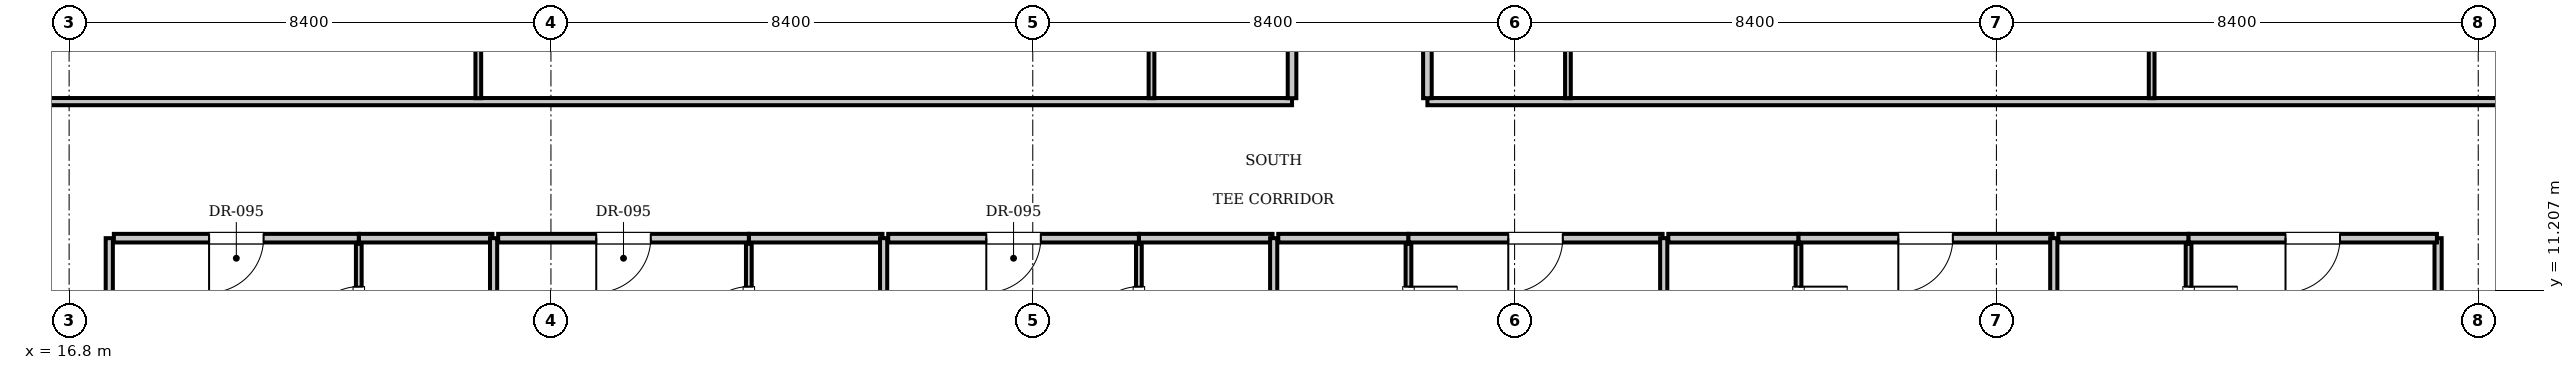
"""IFC4 building model, lengths in metres.
Left out: names, types, materials, properties, quantities, classifications, styles, units other than length and angle.
Written with IfcOpenShell. Run it as: python <this file> out.ifc"""

import sys

from ifc_helpers import new_model, si_unit, direction, frame, frame_2d, origin, place, context, subcontext, project, spatial, rectangle, extrude, element, fill, save


model = new_model("IFC4")
c1 = context("Model", 3, precision=1e-05, world=origin(), true_north=direction((0.0, 1.0)))
c2 = subcontext(c1, "Body", "Model", "MODEL_VIEW")
j1 = project(units=[si_unit("LENGTHUNIT", "METRE"), si_unit("PLANEANGLEUNIT", "RADIAN")], contexts=[c1])
p1 = place(None, origin())
s1 = spatial("IfcSite", under=j1, at=p1, CompositionType="ELEMENT")
p2 = place(p1, origin())
s2 = spatial("IfcBuilding", under=s1, at=p2, CompositionType="ELEMENT")
p3 = place(p2, frame((0.0, 0.0, 154.35)))
s3 = spatial("IfcBuildingStorey", under=s2, at=p3, CompositionType="ELEMENT", Elevation=154.35)
for number, where, z_axis, x_axis in (
    (1, (17.5, 9.0, 0.0), (0.0, 0.0, 1.0), (0.0, 1.0, 0.0)),
    (2, (58.1, 9.0, 0.0), (0.0, 0.0, 1.0), (0.0, 1.0, 0.0)),
):
    element("IfcWall", number, at=place(p3, frame(where, z_axis=z_axis, x_axis=x_axis)), inside=s3, PredefinedType="PARTITIONING", context=c2, shape_type="SweptSolid", body=[
        extrude(rectangle(XDim=3.12, YDim=0.125, at=frame_2d((1.56, 0.0))), origin(), (0.0, 0.0, 1.0), 3.61),
    ])
p4 = place(p3, frame((21.85, 12.12, 0.0), z_axis=(0.0, 0.0, 1.0), x_axis=(1.0, 0.0, 0.0)))
e3 = element("IfcWall", 3, at=p4, inside=s3, PredefinedType="PARTITIONING", context=c2, shape_type="SweptSolid", body=[
    extrude(rectangle(XDim=2.33, YDim=0.15, at=frame_2d((1.165, 0.0))), origin(), (0.0, 0.0, 1.0), 3.61),
])
p5 = place(p3, frame((21.85, 9.68, 0.0), z_axis=(0.0, 0.0, 1.0), x_axis=(0.0, 1.0, 0.0)))
e4 = element("IfcWall", 4, at=p5, inside=s3, PredefinedType="PARTITIONING", context=c2, shape_type="SweptSolid", body=[
    extrude(rectangle(XDim=2.34, YDim=0.1, at=frame_2d((1.17, 0.0))), origin(), (0.0, 0.0, 1.0), 3.61),
])
p6 = place(p5, frame((0.745, 0.0, 0.0)))
e5 = element("IfcOpeningElement", 5, at=p6, cuts=e4, PredefinedType="OPENING", context=c2, shape_type="SweptSolid", body=[
    extrude(rectangle(XDim=0.85, YDim=2.1, at=frame_2d((0.425, 1.05))), frame((0.0, 0.06, 0.0), z_axis=(0.0, -1.0, 0.0), x_axis=(1.0, 0.0, 0.0)), (0.0, 0.0, 1.0), 0.12),
])
p7 = place(p3, frame((17.58, 12.12, 0.0), z_axis=(0.0, 0.0, 1.0), x_axis=(1.0, 0.0, 0.0)))
e6 = element("IfcWall", 6, at=p7, inside=s3, PredefinedType="PARTITIONING", context=c2, shape_type="SweptSolid", body=[
    extrude(rectangle(XDim=4.27, YDim=0.15, at=frame_2d((2.135, 0.0))), origin(), (0.0, 0.0, 1.0), 3.61),
])
p8 = place(p7, frame((1.66, 0.0, 0.0)))
e7 = element("IfcOpeningElement", 7, at=p8, cuts=e6, PredefinedType="OPENING", context=c2, shape_type="SweptSolid", body=[
    extrude(rectangle(XDim=0.95, YDim=2.15, at=frame_2d((0.475, 1.075))), frame((0.0, 0.085, 0.0), z_axis=(0.0, -1.0, 0.0), x_axis=(1.0, 0.0, 0.0)), (0.0, 0.0, 1.0), 0.17),
])
p9 = place(p3, frame((24.2, 4.7, 0.0), z_axis=(0.0, 0.0, 1.0), x_axis=(0.0, 1.0, 0.0)))
e8 = element("IfcWall", 8, at=p9, inside=s3, PredefinedType="PARTITIONING", context=c2, shape_type="SweptSolid", body=[
    extrude(rectangle(XDim=7.42, YDim=0.125, at=frame_2d((3.71, 0.0))), origin(), (0.0, 0.0, 1.0), 3.61),
])
p10 = place(p3, frame((28.65, 12.12, 0.0), z_axis=(0.0, 0.0, 1.0), x_axis=(1.0, 0.0, 0.0)))
e9 = element("IfcWall", 9, at=p10, inside=s3, PredefinedType="PARTITIONING", context=c2, shape_type="SweptSolid", body=[
    extrude(rectangle(XDim=2.33, YDim=0.15, at=frame_2d((1.165, 0.0))), origin(), (0.0, 0.0, 1.0), 3.61),
])
p11 = place(p3, frame((28.65, 9.68, 0.0), z_axis=(0.0, 0.0, 1.0), x_axis=(0.0, 1.0, 0.0)))
e10 = element("IfcWall", 10, at=p11, inside=s3, PredefinedType="PARTITIONING", context=c2, shape_type="SweptSolid", body=[
    extrude(rectangle(XDim=2.34, YDim=0.1, at=frame_2d((1.17, 0.0))), origin(), (0.0, 0.0, 1.0), 3.61),
])
p12 = place(p11, frame((0.745, 0.0, 0.0)))
e11 = element("IfcOpeningElement", 11, at=p12, cuts=e10, PredefinedType="OPENING", context=c2, shape_type="SweptSolid", body=[
    extrude(rectangle(XDim=0.85, YDim=2.1, at=frame_2d((0.425, 1.05))), frame((0.0, 0.06, 0.0), z_axis=(0.0, -1.0, 0.0), x_axis=(1.0, 0.0, 0.0)), (0.0, 0.0, 1.0), 0.12),
])
p13 = place(p3, frame((24.28, 12.12, 0.0), z_axis=(0.0, 0.0, 1.0), x_axis=(1.0, 0.0, 0.0)))
e12 = element("IfcWall", 12, at=p13, inside=s3, PredefinedType="PARTITIONING", context=c2, shape_type="SweptSolid", body=[
    extrude(rectangle(XDim=4.37, YDim=0.15, at=frame_2d((2.185, 0.0))), origin(), (0.0, 0.0, 1.0), 3.61),
])
p14 = place(p13, frame((1.71, 0.0, 0.0)))
e13 = element("IfcOpeningElement", 13, at=p14, cuts=e12, PredefinedType="OPENING", context=c2, shape_type="SweptSolid", body=[
    extrude(rectangle(XDim=0.95, YDim=2.15, at=frame_2d((0.475, 1.075))), frame((0.0, 0.085, 0.0), z_axis=(0.0, -1.0, 0.0), x_axis=(1.0, 0.0, 0.0)), (0.0, 0.0, 1.0), 0.17),
])
p15 = place(p3, frame((31.0, 4.7, 0.0), z_axis=(0.0, 0.0, 1.0), x_axis=(0.0, 1.0, 0.0)))
e14 = element("IfcWall", 14, at=p15, inside=s3, PredefinedType="PARTITIONING", context=c2, shape_type="SweptSolid", body=[
    extrude(rectangle(XDim=7.42, YDim=0.125, at=frame_2d((3.71, 0.0))), origin(), (0.0, 0.0, 1.0), 3.61),
])
p16 = place(p3, frame((35.45, 12.12, 0.0), z_axis=(0.0, 0.0, 1.0), x_axis=(1.0, 0.0, 0.0)))
e15 = element("IfcWall", 15, at=p16, inside=s3, PredefinedType="PARTITIONING", context=c2, shape_type="SweptSolid", body=[
    extrude(rectangle(XDim=2.33, YDim=0.15, at=frame_2d((1.165, 0.0))), origin(), (0.0, 0.0, 1.0), 3.61),
])
p17 = place(p3, frame((35.45, 9.68, 0.0), z_axis=(0.0, 0.0, 1.0), x_axis=(0.0, 1.0, 0.0)))
e16 = element("IfcWall", 16, at=p17, inside=s3, PredefinedType="PARTITIONING", context=c2, shape_type="SweptSolid", body=[
    extrude(rectangle(XDim=2.34, YDim=0.1, at=frame_2d((1.17, 0.0))), origin(), (0.0, 0.0, 1.0), 3.61),
])
p18 = place(p17, frame((0.745, 0.0, 0.0)))
e17 = element("IfcOpeningElement", 17, at=p18, cuts=e16, PredefinedType="OPENING", context=c2, shape_type="SweptSolid", body=[
    extrude(rectangle(XDim=0.85, YDim=2.1, at=frame_2d((0.425, 1.05))), frame((0.0, 0.06, 0.0), z_axis=(0.0, -1.0, 0.0), x_axis=(1.0, 0.0, 0.0)), (0.0, 0.0, 1.0), 0.12),
])
p19 = place(p3, frame((31.08, 12.12, 0.0), z_axis=(0.0, 0.0, 1.0), x_axis=(1.0, 0.0, 0.0)))
e18 = element("IfcWall", 18, at=p19, inside=s3, PredefinedType="PARTITIONING", context=c2, shape_type="SweptSolid", body=[
    extrude(rectangle(XDim=4.37, YDim=0.15, at=frame_2d((2.185, 0.0))), origin(), (0.0, 0.0, 1.0), 3.61),
])
p20 = place(p19, frame((1.71, 0.0, 0.0)))
e19 = element("IfcOpeningElement", 19, at=p20, cuts=e18, PredefinedType="OPENING", context=c2, shape_type="SweptSolid", body=[
    extrude(rectangle(XDim=0.95, YDim=2.15, at=frame_2d((0.475, 1.075))), frame((0.0, 0.085, 0.0), z_axis=(0.0, -1.0, 0.0), x_axis=(1.0, 0.0, 0.0)), (0.0, 0.0, 1.0), 0.17),
])
p21 = place(p3, frame((37.8, 4.7, 0.0), z_axis=(0.0, 0.0, 1.0), x_axis=(0.0, 1.0, 0.0)))
e20 = element("IfcWall", 20, at=p21, inside=s3, PredefinedType="PARTITIONING", context=c2, shape_type="SweptSolid", body=[
    extrude(rectangle(XDim=7.42, YDim=0.125, at=frame_2d((3.71, 0.0))), origin(), (0.0, 0.0, 1.0), 3.3),
])
p22 = place(p3, frame((37.88, 12.12, 0.0), z_axis=(0.0, 0.0, 1.0), x_axis=(1.0, 0.0, 0.0)))
e21 = element("IfcWall", 21, at=p22, inside=s3, PredefinedType="PARTITIONING", context=c2, shape_type="SweptSolid", body=[
    extrude(rectangle(XDim=2.27, YDim=0.15, at=frame_2d((1.135, 0.0))), origin(), (0.0, 0.0, 1.0), 3.61),
])
p23 = place(p3, frame((40.15, 9.68, 0.0), z_axis=(0.0, 0.0, 1.0), x_axis=(0.0, 1.0, 0.0)))
e22 = element("IfcWall", 22, at=p23, inside=s3, PredefinedType="PARTITIONING", context=c2, shape_type="SweptSolid", body=[
    extrude(rectangle(XDim=2.34, YDim=0.1, at=frame_2d((1.17, 0.0))), origin(), (0.0, 0.0, 1.0), 3.61),
])
p24 = place(p23, frame((0.745, 0.0, 0.0)))
e23 = element("IfcOpeningElement", 23, at=p24, cuts=e22, PredefinedType="OPENING", context=c2, shape_type="SweptSolid", body=[
    extrude(rectangle(XDim=0.85, YDim=2.1, at=frame_2d((0.425, 1.05))), frame((0.0, 0.06, 0.0), z_axis=(0.0, -1.0, 0.0), x_axis=(1.0, 0.0, 0.0)), (0.0, 0.0, 1.0), 0.12),
])
p25 = place(p3, frame((40.15, 12.12, 0.0), z_axis=(0.0, 0.0, 1.0), x_axis=(1.0, 0.0, 0.0)))
e24 = element("IfcWall", 24, at=p25, inside=s3, PredefinedType="PARTITIONING", context=c2, shape_type="SweptSolid", body=[
    extrude(rectangle(XDim=4.43, YDim=0.15, at=frame_2d((2.215, 0.0))), origin(), (0.0, 0.0, 1.0), 3.61),
])
p26 = place(p25, frame((1.74, 0.0, 0.0)))
e25 = element("IfcOpeningElement", 25, at=p26, cuts=e24, PredefinedType="OPENING", context=c2, shape_type="SweptSolid", body=[
    extrude(rectangle(XDim=0.95, YDim=2.15, at=frame_2d((0.475, 1.075))), frame((0.0, 0.085, 0.0), z_axis=(0.0, -1.0, 0.0), x_axis=(1.0, 0.0, 0.0)), (0.0, 0.0, 1.0), 0.17),
])
p27 = place(p3, frame((44.6, 4.7, 0.0), z_axis=(0.0, 0.0, 1.0), x_axis=(0.0, 1.0, 0.0)))
e26 = element("IfcWall", 26, at=p27, inside=s3, PredefinedType="PARTITIONING", context=c2, shape_type="SweptSolid", body=[
    extrude(rectangle(XDim=7.42, YDim=0.125, at=frame_2d((3.71, 0.0))), origin(), (0.0, 0.0, 1.0), 3.61),
])
p28 = place(p3, frame((44.68, 12.12, 0.0), z_axis=(0.0, 0.0, 1.0), x_axis=(1.0, 0.0, 0.0)))
e27 = element("IfcWall", 27, at=p28, inside=s3, PredefinedType="PARTITIONING", context=c2, shape_type="SweptSolid", body=[
    extrude(rectangle(XDim=2.27, YDim=0.15, at=frame_2d((1.135, 0.0))), origin(), (0.0, 0.0, 1.0), 3.61),
])
p29 = place(p3, frame((46.95, 9.68, 0.0), z_axis=(0.0, 0.0, 1.0), x_axis=(0.0, 1.0, 0.0)))
e28 = element("IfcWall", 28, at=p29, inside=s3, PredefinedType="PARTITIONING", context=c2, shape_type="SweptSolid", body=[
    extrude(rectangle(XDim=2.34, YDim=0.1, at=frame_2d((1.17, 0.0))), origin(), (0.0, 0.0, 1.0), 3.61),
])
p30 = place(p29, frame((0.745, 0.0, 0.0)))
e29 = element("IfcOpeningElement", 29, at=p30, cuts=e28, PredefinedType="OPENING", context=c2, shape_type="SweptSolid", body=[
    extrude(rectangle(XDim=0.85, YDim=2.1, at=frame_2d((0.425, 1.05))), frame((0.0, 0.06, 0.0), z_axis=(0.0, -1.0, 0.0), x_axis=(1.0, 0.0, 0.0)), (0.0, 0.0, 1.0), 0.12),
])
p31 = place(p3, frame((46.95, 12.12, 0.0), z_axis=(0.0, 0.0, 1.0), x_axis=(1.0, 0.0, 0.0)))
e30 = element("IfcWall", 30, at=p31, inside=s3, PredefinedType="PARTITIONING", context=c2, shape_type="SweptSolid", body=[
    extrude(rectangle(XDim=4.43, YDim=0.15, at=frame_2d((2.215, 0.0))), origin(), (0.0, 0.0, 1.0), 3.61),
])
p32 = place(p31, frame((1.74, 0.0, 0.0)))
e31 = element("IfcOpeningElement", 31, at=p32, cuts=e30, PredefinedType="OPENING", context=c2, shape_type="SweptSolid", body=[
    extrude(rectangle(XDim=0.95, YDim=2.15, at=frame_2d((0.475, 1.075))), frame((0.0, 0.085, 0.0), z_axis=(0.0, -1.0, 0.0), x_axis=(1.0, 0.0, 0.0)), (0.0, 0.0, 1.0), 0.17),
])
p33 = place(p3, frame((51.4, 4.7, 0.0), z_axis=(0.0, 0.0, 1.0), x_axis=(0.0, 1.0, 0.0)))
e32 = element("IfcWall", 32, at=p33, inside=s3, PredefinedType="PARTITIONING", context=c2, shape_type="SweptSolid", body=[
    extrude(rectangle(XDim=7.42, YDim=0.125, at=frame_2d((3.71, 0.0))), origin(), (0.0, 0.0, 1.0), 3.61),
])
p34 = place(p3, frame((51.48, 12.12, 0.0), z_axis=(0.0, 0.0, 1.0), x_axis=(1.0, 0.0, 0.0)))
e33 = element("IfcWall", 33, at=p34, inside=s3, PredefinedType="PARTITIONING", context=c2, shape_type="SweptSolid", body=[
    extrude(rectangle(XDim=2.27, YDim=0.15, at=frame_2d((1.135, 0.0))), origin(), (0.0, 0.0, 1.0), 3.61),
])
p35 = place(p3, frame((53.75, 9.68, 0.0), z_axis=(0.0, 0.0, 1.0), x_axis=(0.0, 1.0, 0.0)))
e34 = element("IfcWall", 34, at=p35, inside=s3, PredefinedType="PARTITIONING", context=c2, shape_type="SweptSolid", body=[
    extrude(rectangle(XDim=2.34, YDim=0.1, at=frame_2d((1.17, 0.0))), origin(), (0.0, 0.0, 1.0), 3.61),
])
p36 = place(p35, frame((0.745, 0.0, 0.0)))
e35 = element("IfcOpeningElement", 35, at=p36, cuts=e34, PredefinedType="OPENING", context=c2, shape_type="SweptSolid", body=[
    extrude(rectangle(XDim=0.85, YDim=2.1, at=frame_2d((0.425, 1.05))), frame((0.0, 0.06, 0.0), z_axis=(0.0, -1.0, 0.0), x_axis=(1.0, 0.0, 0.0)), (0.0, 0.0, 1.0), 0.12),
])
p37 = place(p3, frame((53.75, 12.12, 0.0), z_axis=(0.0, 0.0, 1.0), x_axis=(1.0, 0.0, 0.0)))
e36 = element("IfcWall", 36, at=p37, inside=s3, PredefinedType="PARTITIONING", context=c2, shape_type="SweptSolid", body=[
    extrude(rectangle(XDim=4.33, YDim=0.15, at=frame_2d((2.165, 0.0))), origin(), (0.0, 0.0, 1.0), 3.61),
])
p38 = place(p37, frame((1.69, 0.0, 0.0)))
e37 = element("IfcOpeningElement", 37, at=p38, cuts=e36, PredefinedType="OPENING", context=c2, shape_type="SweptSolid", body=[
    extrude(rectangle(XDim=0.95, YDim=2.15, at=frame_2d((0.475, 1.075))), frame((0.0, 0.085, 0.0), z_axis=(0.0, -1.0, 0.0), x_axis=(1.0, 0.0, 0.0)), (0.0, 0.0, 1.0), 0.17),
])
p39 = place(p3, frame((13.2, 14.5, 0.0), z_axis=(0.0, 0.0, 1.0), x_axis=(1.0, 0.0, 0.0)))
e38 = element("IfcWall", 38, at=p39, inside=s3, PredefinedType="PARTITIONING", context=c2, shape_type="SweptSolid", body=[
    extrude(rectangle(XDim=24.92, YDim=0.125, at=frame_2d((12.46, 0.0))), origin(), (0.0, 0.0, 1.0), 3.61),
])
p40 = place(p3, frame((40.48, 14.5, 0.0), z_axis=(0.0, 0.0, 1.0), x_axis=(1.0, 0.0, 0.0)))
e39 = element("IfcWall", 39, at=p40, inside=s3, PredefinedType="PARTITIONING", context=c2, shape_type="SweptSolid", body=[
    extrude(rectangle(XDim=21.92, YDim=0.125, at=frame_2d((10.96, 0.0))), origin(), (0.0, 0.0, 1.0), 3.61),
])
p41 = place(p3, frame((38.12, 14.56, 0.0), z_axis=(0.0, 0.0, 1.0), x_axis=(0.0, 1.0, 0.0)))
e40 = element("IfcWall", 40, at=p41, inside=s3, PredefinedType="PARTITIONING", context=c2, shape_type="SweptSolid", body=[
    extrude(rectangle(XDim=1.93, YDim=0.15, at=frame_2d((0.965, 0.0))), origin(), (0.0, 0.0, 1.0), 3.61),
])
p42 = place(p3, frame((35.67, 14.56, 0.0), z_axis=(0.0, 0.0, 1.0), x_axis=(0.0, 1.0, 0.0)))
e41 = element("IfcWall", 41, at=p42, inside=s3, PredefinedType="PARTITIONING", context=c2, shape_type="SweptSolid", body=[
    extrude(rectangle(XDim=1.93, YDim=0.1, at=frame_2d((0.965, 0.0))), origin(), (0.0, 0.0, 1.0), 3.61),
])
p43 = place(p3, frame((23.934, 14.56, 0.0), z_axis=(0.0, 0.0, 1.0), x_axis=(0.0, 1.0, 0.0)))
e42 = element("IfcWall", 42, at=p43, inside=s3, PredefinedType="PARTITIONING", context=c2, shape_type="SweptSolid", body=[
    extrude(rectangle(XDim=5.41, YDim=0.1, at=frame_2d((2.705, 0.0))), origin(), (0.0, 0.0, 1.0), 3.61),
])
p44 = place(p43, frame((1.775, 0.0, 0.0)))
e43 = element("IfcOpeningElement", 43, at=p44, cuts=e42, PredefinedType="OPENING", context=c2, shape_type="SweptSolid", body=[
    extrude(rectangle(XDim=0.9, YDim=2.1, at=frame_2d((0.45, 1.05))), frame((0.0, 0.06, 0.0), z_axis=(0.0, -1.0, 0.0), x_axis=(1.0, 0.0, 0.0)), (0.0, 0.0, 1.0), 0.12),
])
p45 = place(p3, frame((40.48, 14.56, 0.0), z_axis=(0.0, 0.0, 1.0), x_axis=(0.0, 1.0, 0.0)))
e44 = element("IfcWall", 44, at=p45, inside=s3, PredefinedType="PARTITIONING", context=c2, shape_type="SweptSolid", body=[
    extrude(rectangle(XDim=1.93, YDim=0.15, at=frame_2d((0.965, 0.0))), origin(), (0.0, 0.0, 1.0), 3.61),
])
p46 = place(p3, frame((42.93, 14.56, 0.0), z_axis=(0.0, 0.0, 1.0), x_axis=(0.0, 1.0, 0.0)))
e45 = element("IfcWall", 45, at=p46, inside=s3, PredefinedType="PARTITIONING", context=c2, shape_type="SweptSolid", body=[
    extrude(rectangle(XDim=1.93, YDim=0.1, at=frame_2d((0.965, 0.0))), origin(), (0.0, 0.0, 1.0), 3.61),
])
p47 = place(p3, frame((53.106, 14.56, 0.0), z_axis=(0.0, 0.0, 1.0), x_axis=(0.0, 1.0, 0.0)))
e46 = element("IfcWall", 46, at=p47, inside=s3, PredefinedType="PARTITIONING", context=c2, shape_type="SweptSolid", body=[
    extrude(rectangle(XDim=5.41, YDim=0.1, at=frame_2d((2.705, 0.0))), origin(), (0.0, 0.0, 1.0), 3.61),
])
p48 = place(p47, frame((2.255, 0.0, 0.0)))
e47 = element("IfcOpeningElement", 47, at=p48, cuts=e46, PredefinedType="OPENING", context=c2, shape_type="SweptSolid", body=[
    extrude(rectangle(XDim=0.9, YDim=2.1, at=frame_2d((0.45, 1.05))), frame((0.0, 0.06, 0.0), z_axis=(0.0, -1.0, 0.0), x_axis=(1.0, 0.0, 0.0)), (0.0, 0.0, 1.0), 0.12),
])
p49 = place(p6, origin())
e48 = element("IfcDoor", 48, at=p49, inside=s3, OperationType="SINGLE_SWING_LEFT", PredefinedType="DOOR", context=c2, shape_type="SweptSolid", body=[
    extrude(rectangle(XDim=0.85, YDim=2.1, at=frame_2d((0.425, 1.05))), frame((0.0, 0.025, 0.0), z_axis=(0.0, -1.0, 0.0), x_axis=(1.0, 0.0, 0.0)), (0.0, 0.0, 1.0), 0.05),
])
fill(e5, e48)
p50 = place(p8, frame((0.95, 0.0, 0.0), z_axis=(0.0, 0.0, 1.0), x_axis=(-1.0, 0.0, 0.0)))
e49 = element("IfcDoor", 49, at=p50, inside=s3, OperationType="SINGLE_SWING_RIGHT", PredefinedType="DOOR", context=c2, shape_type="SweptSolid", body=[
    extrude(rectangle(XDim=0.95, YDim=2.15, at=frame_2d((0.475, 1.075))), frame((0.0, 0.025, 0.0), z_axis=(0.0, -1.0, 0.0), x_axis=(1.0, 0.0, 0.0)), (0.0, 0.0, 1.0), 0.05),
])
fill(e7, e49)
p51 = place(p12, origin())
e50 = element("IfcDoor", 50, at=p51, inside=s3, OperationType="SINGLE_SWING_LEFT", PredefinedType="DOOR", context=c2, shape_type="SweptSolid", body=[
    extrude(rectangle(XDim=0.85, YDim=2.1, at=frame_2d((0.425, 1.05))), frame((0.0, 0.025, 0.0), z_axis=(0.0, -1.0, 0.0), x_axis=(1.0, 0.0, 0.0)), (0.0, 0.0, 1.0), 0.05),
])
fill(e11, e50)
p52 = place(p14, frame((0.95, 0.0, 0.0), z_axis=(0.0, 0.0, 1.0), x_axis=(-1.0, 0.0, 0.0)))
e51 = element("IfcDoor", 51, at=p52, inside=s3, OperationType="SINGLE_SWING_RIGHT", PredefinedType="DOOR", context=c2, shape_type="SweptSolid", body=[
    extrude(rectangle(XDim=0.95, YDim=2.15, at=frame_2d((0.475, 1.075))), frame((0.0, 0.025, 0.0), z_axis=(0.0, -1.0, 0.0), x_axis=(1.0, 0.0, 0.0)), (0.0, 0.0, 1.0), 0.05),
])
fill(e13, e51)
p53 = place(p18, origin())
e52 = element("IfcDoor", 52, at=p53, inside=s3, OperationType="SINGLE_SWING_LEFT", PredefinedType="DOOR", context=c2, shape_type="SweptSolid", body=[
    extrude(rectangle(XDim=0.85, YDim=2.1, at=frame_2d((0.425, 1.05))), frame((0.0, 0.025, 0.0), z_axis=(0.0, -1.0, 0.0), x_axis=(1.0, 0.0, 0.0)), (0.0, 0.0, 1.0), 0.05),
])
fill(e17, e52)
p54 = place(p20, frame((0.95, 0.0, 0.0), z_axis=(0.0, 0.0, 1.0), x_axis=(-1.0, 0.0, 0.0)))
e53 = element("IfcDoor", 53, at=p54, inside=s3, OperationType="SINGLE_SWING_RIGHT", PredefinedType="DOOR", context=c2, shape_type="SweptSolid", body=[
    extrude(rectangle(XDim=0.95, YDim=2.15, at=frame_2d((0.475, 1.075))), frame((0.0, 0.025, 0.0), z_axis=(0.0, -1.0, 0.0), x_axis=(1.0, 0.0, 0.0)), (0.0, 0.0, 1.0), 0.05),
])
fill(e19, e53)
p55 = place(p24, frame((0.85, 0.0, 0.0), z_axis=(0.0, 0.0, 1.0), x_axis=(-1.0, 0.0, 0.0)))
e54 = element("IfcDoor", 54, at=p55, inside=s3, OperationType="SINGLE_SWING_LEFT", PredefinedType="DOOR", context=c2, shape_type="SweptSolid", body=[
    extrude(rectangle(XDim=0.85, YDim=2.1, at=frame_2d((0.425, 1.05))), frame((0.0, 0.025, 0.0), z_axis=(0.0, -1.0, 0.0), x_axis=(1.0, 0.0, 0.0)), (0.0, 0.0, 1.0), 0.05),
])
fill(e23, e54)
p56 = place(p26, frame((0.95, 0.0, 0.0), z_axis=(0.0, 0.0, 1.0), x_axis=(-1.0, 0.0, 0.0)))
e55 = element("IfcDoor", 55, at=p56, inside=s3, OperationType="SINGLE_SWING_RIGHT", PredefinedType="DOOR", context=c2, shape_type="SweptSolid", body=[
    extrude(rectangle(XDim=0.95, YDim=2.15, at=frame_2d((0.475, 1.075))), frame((0.0, 0.025, 0.0), z_axis=(0.0, -1.0, 0.0), x_axis=(1.0, 0.0, 0.0)), (0.0, 0.0, 1.0), 0.05),
])
fill(e25, e55)
p57 = place(p30, frame((0.85, 0.0, 0.0), z_axis=(0.0, 0.0, 1.0), x_axis=(-1.0, 0.0, 0.0)))
e56 = element("IfcDoor", 56, at=p57, inside=s3, OperationType="SINGLE_SWING_LEFT", PredefinedType="DOOR", context=c2, shape_type="SweptSolid", body=[
    extrude(rectangle(XDim=0.85, YDim=2.1, at=frame_2d((0.425, 1.05))), frame((0.0, 0.025, 0.0), z_axis=(0.0, -1.0, 0.0), x_axis=(1.0, 0.0, 0.0)), (0.0, 0.0, 1.0), 0.05),
])
fill(e29, e56)
p58 = place(p32, frame((0.95, 0.0, 0.0), z_axis=(0.0, 0.0, 1.0), x_axis=(-1.0, 0.0, 0.0)))
e57 = element("IfcDoor", 57, at=p58, inside=s3, OperationType="SINGLE_SWING_RIGHT", PredefinedType="DOOR", context=c2, shape_type="SweptSolid", body=[
    extrude(rectangle(XDim=0.95, YDim=2.15, at=frame_2d((0.475, 1.075))), frame((0.0, 0.025, 0.0), z_axis=(0.0, -1.0, 0.0), x_axis=(1.0, 0.0, 0.0)), (0.0, 0.0, 1.0), 0.05),
])
fill(e31, e57)
p59 = place(p36, frame((0.85, 0.0, 0.0), z_axis=(0.0, 0.0, 1.0), x_axis=(-1.0, 0.0, 0.0)))
e58 = element("IfcDoor", 58, at=p59, inside=s3, OperationType="SINGLE_SWING_LEFT", PredefinedType="DOOR", context=c2, shape_type="SweptSolid", body=[
    extrude(rectangle(XDim=0.85, YDim=2.1, at=frame_2d((0.425, 1.05))), frame((0.0, 0.025, 0.0), z_axis=(0.0, -1.0, 0.0), x_axis=(1.0, 0.0, 0.0)), (0.0, 0.0, 1.0), 0.05),
])
fill(e35, e58)
p60 = place(p38, frame((0.95, 0.0, 0.0), z_axis=(0.0, 0.0, 1.0), x_axis=(-1.0, 0.0, 0.0)))
e59 = element("IfcDoor", 59, at=p60, inside=s3, OperationType="SINGLE_SWING_RIGHT", PredefinedType="DOOR", context=c2, shape_type="SweptSolid", body=[
    extrude(rectangle(XDim=0.95, YDim=2.15, at=frame_2d((0.475, 1.075))), frame((0.0, 0.025, 0.0), z_axis=(0.0, -1.0, 0.0), x_axis=(1.0, 0.0, 0.0)), (0.0, 0.0, 1.0), 0.05),
])
fill(e37, e59)
save(model, sys.argv[1])
